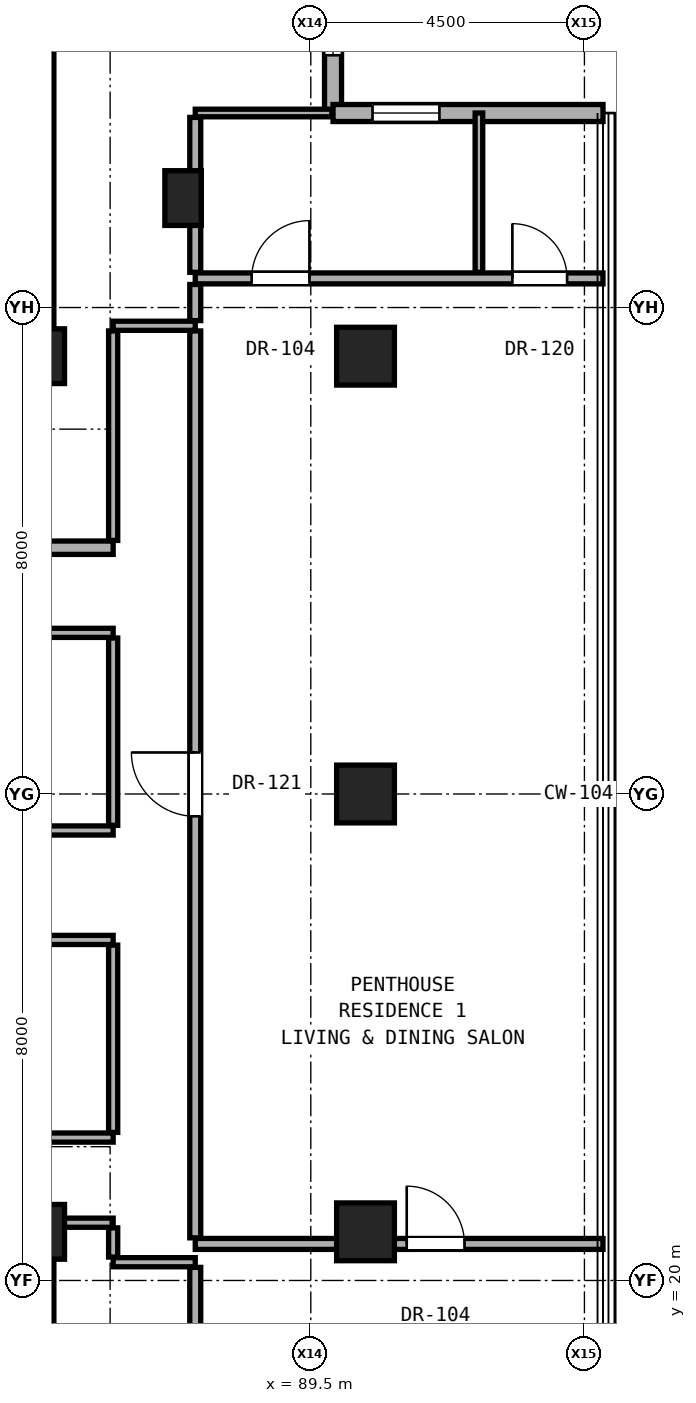
"""IFC4 building model, lengths in metres.
Left out: names, types, materials, properties, quantities, classifications, styles, units other than length and angle.
Written with IfcOpenShell. Run it as: python <this file> out.ifc"""

import sys

from ifc_helpers import new_model, si_unit, direction, frame, frame_2d, origin, origin_2d, place, context, subcontext, project, spatial, rectangle, hollow_rectangle, extrude, element, fill, save


model = new_model("IFC4")
c1 = context("Model", 3, precision=1e-05, world=origin(), true_north=direction((0.0, 1.0)))
c2 = subcontext(c1, "Body", "Model", "MODEL_VIEW")
j1 = project(units=[si_unit("LENGTHUNIT", "METRE"), si_unit("PLANEANGLEUNIT", "RADIAN")], contexts=[c1])
p1 = place(None, origin())
s1 = spatial("IfcSite", under=j1, at=p1, CompositionType="ELEMENT")
p2 = place(p1, origin())
s2 = spatial("IfcBuilding", under=s1, at=p2, CompositionType="ELEMENT")
p3 = place(p2, frame((0.0, 0.0, 203.15)))
s3 = spatial("IfcBuildingStorey", under=s2, at=p3, CompositionType="ELEMENT", Elevation=203.15)
for number, where, z_axis, x_axis in (
    (1, (85.0, 20.8, 0.0), (0.0, 0.0, 1.0), (1.0, 0.0, 0.0)),
    (2, (85.0, 35.2, 0.0), (0.0, 0.0, 1.0), (1.0, 0.0, 0.0)),
):
    element("IfcColumn", number, at=place(p3, frame(where, z_axis=z_axis, x_axis=x_axis)), inside=s3, PredefinedType="COLUMN", context=c2, shape_type="SweptSolid", body=[
        extrude(rectangle(XDim=0.9, YDim=0.9, at=origin_2d()), origin(), (0.0, 0.0, 1.0), 3.25),
    ])
for number, where, z_axis, x_axis in (
    (3, (90.4, 20.8, 0.0), (0.0, 0.0, 1.0), (1.0, 0.0, 0.0)),
    (4, (90.4, 28.0, 0.0), (0.0, 0.0, 1.0), (1.0, 0.0, 0.0)),
    (5, (90.4, 35.2, 0.0), (0.0, 0.0, 1.0), (1.0, 0.0, 0.0)),
):
    element("IfcColumn", number, at=place(p3, frame(where, z_axis=z_axis, x_axis=x_axis)), inside=s3, PredefinedType="COLUMN", context=c2, shape_type="SweptSolid", body=[
        extrude(hollow_rectangle(XDim=0.95, YDim=0.95, WallThickness=0.05, at=origin_2d()), origin(), (0.0, 0.0, 1.0), 3.25),
    ])
p4 = place(p3, frame((87.4, 37.8, 0.0), z_axis=(0.0, 0.0, 1.0), x_axis=(1.0, 0.0, 0.0)))
e6 = element("IfcColumn", 6, at=p4, inside=s3, PredefinedType="PILASTER", context=c2, shape_type="SweptSolid", body=[
    extrude(rectangle(XDim=0.6, YDim=0.9, at=origin_2d()), origin(), (0.0, 0.0, 1.0), 3.25),
])
for number, where, z_axis, x_axis in (
    (7, (85.0, 35.2, 0.0), (0.0, 0.0, 1.0), (0.0, 1.0, 0.0)),
    (8, (85.0, 15.2, 0.0), (0.0, 0.0, 1.0), (0.0, 1.0, 0.0)),
):
    element("IfcWall", number, at=place(p3, frame(where, z_axis=z_axis, x_axis=x_axis)), inside=s3, PredefinedType="SHEAR", context=c2, shape_type="SweptSolid", body=[
        extrude(rectangle(XDim=5.6, YDim=0.55, at=frame_2d((2.8, 0.0))), origin(), (0.0, 0.0, 1.0), 3.05),
    ])
p5 = place(p3, frame((89.866, 39.198, 0.0), z_axis=(0.0, 0.0, 1.0), x_axis=(0.0, 1.0, 0.0)))
e9 = element("IfcWall", 9, at=p5, inside=s3, PredefinedType="SOLIDWALL", context=c2, shape_type="SweptSolid", body=[
    extrude(rectangle(XDim=4.44, YDim=0.28, at=frame_2d((2.22, 0.0))), origin(), (0.0, 0.0, 1.0), 3.03),
])
p6 = place(p5, frame((0.95, 0.0, 0.85)))
e10 = element("IfcOpeningElement", 10, at=p6, cuts=e9, PredefinedType="OPENING", context=c2, shape_type="SweptSolid", body=[
    extrude(rectangle(XDim=1.1, YDim=2.0, at=frame_2d((0.55, 1.0))), frame((0.0, 0.15, 0.0), z_axis=(0.0, -1.0, 0.0), x_axis=(1.0, 0.0, 0.0)), (0.0, 0.0, 1.0), 0.3),
])
p7 = place(p3, frame((94.305, 39.198, 0.0), z_axis=(0.0, 0.0, 1.0), x_axis=(-1.0, 0.0, 0.0)))
e11 = element("IfcWall", 11, at=p7, inside=s3, PredefinedType="SOLIDWALL", context=c2, shape_type="SweptSolid", body=[
    extrude(rectangle(XDim=4.44, YDim=0.28, at=frame_2d((2.22, 0.0))), origin(), (0.0, 0.0, 1.0), 3.03),
])
p8 = place(p7, frame((2.69, 0.0, 0.85)))
e12 = element("IfcOpeningElement", 12, at=p8, cuts=e11, PredefinedType="OPENING", context=c2, shape_type="SweptSolid", body=[
    extrude(rectangle(XDim=1.1, YDim=2.0, at=frame_2d((0.55, 1.0))), frame((0.0, 0.15, 0.0), z_axis=(0.0, -1.0, 0.0), x_axis=(1.0, 0.0, 0.0)), (0.0, 0.0, 1.0), 0.3),
])
p9 = place(p3, frame((86.25, 20.3, 0.0), z_axis=(0.0, 0.0, 1.0), x_axis=(1.0, 0.0, 0.0)))
e13 = element("IfcWall", 13, at=p9, inside=s3, PredefinedType="PARTITIONING", context=c2, shape_type="SweptSolid", body=[
    extrude(rectangle(XDim=1.35, YDim=0.15, at=frame_2d((0.675, 0.0))), origin(), (0.0, 0.0, 1.0), 3.05),
])
p10 = place(p3, frame((87.6, 20.601, 0.0), z_axis=(0.0, 0.0, 1.0), x_axis=(1.0, 0.0, 0.0)))
e14 = element("IfcWall", 14, at=p10, inside=s3, PredefinedType="PARTITIONING", context=c2, shape_type="SweptSolid", body=[
    extrude(rectangle(XDim=6.705, YDim=0.18, at=frame_2d((3.353, 0.0))), origin(), (0.0, 0.0, 1.0), 2.442),
])
p11 = place(p10, frame((3.478, 0.0, 0.0)))
e15 = element("IfcOpeningElement", 15, at=p11, cuts=e14, PredefinedType="OPENING", context=c2, shape_type="SweptSolid", body=[
    extrude(rectangle(XDim=0.95, YDim=2.15, at=frame_2d((0.475, 1.075))), frame((0.0, 0.1, 0.0), z_axis=(0.0, -1.0, 0.0), x_axis=(1.0, 0.0, 0.0)), (0.0, 0.0, 1.0), 0.2),
])
p12 = place(p3, frame((85.27, 20.95, 0.0), z_axis=(0.0, 0.0, 1.0), x_axis=(1.0, 0.0, 0.0)))
e16 = element("IfcWall", 16, at=p12, inside=s3, PredefinedType="PARTITIONING", context=c2, shape_type="SweptSolid", body=[
    extrude(rectangle(XDim=0.98, YDim=0.15, at=frame_2d((0.49, 0.0))), origin(), (0.0, 0.0, 1.0), 2.442),
])
p13 = place(p3, frame((78.64, 22.35, 0.0), z_axis=(0.0, 0.0, 1.0), x_axis=(1.0, 0.0, 0.0)))
e17 = element("IfcWall", 17, at=p13, inside=s3, PredefinedType="PARTITIONING", context=c2, shape_type="SweptSolid", body=[
    extrude(rectangle(XDim=7.61, YDim=0.15, at=frame_2d((3.805, 0.0))), origin(), (0.0, 0.0, 1.0), 2.186),
])
p14 = place(p13, frame((3.33, 0.0, 0.0)))
e18 = element("IfcOpeningElement", 18, at=p14, cuts=e17, PredefinedType="OPENING", context=c2, shape_type="SweptSolid", body=[
    extrude(rectangle(XDim=0.95, YDim=2.15, at=frame_2d((0.475, 1.075))), frame((0.0, 0.085, 0.0), z_axis=(0.0, -1.0, 0.0), x_axis=(1.0, 0.0, 0.0)), (0.0, 0.0, 1.0), 0.17),
])
for number, where, z_axis, x_axis in (
    (19, (78.6, 25.6, 0.0), (0.0, 0.0, 1.0), (1.0, 0.0, 0.0)),
    (20, (78.6, 27.4, 0.0), (0.0, 0.0, 1.0), (1.0, 0.0, 0.0)),
):
    element("IfcWall", number, at=place(p3, frame(where, z_axis=z_axis, x_axis=x_axis)), inside=s3, PredefinedType="PARTITIONING", context=c2, shape_type="SweptSolid", body=[
        extrude(rectangle(XDim=7.65, YDim=0.15, at=frame_2d((3.825, 0.0))), origin(), (0.0, 0.0, 1.0), 2.186),
    ])
p15 = place(p3, frame((78.64, 30.65, 0.0), z_axis=(0.0, 0.0, 1.0), x_axis=(1.0, 0.0, 0.0)))
e21 = element("IfcWall", 21, at=p15, inside=s3, PredefinedType="PARTITIONING", context=c2, shape_type="SweptSolid", body=[
    extrude(rectangle(XDim=7.61, YDim=0.15, at=frame_2d((3.805, 0.0))), origin(), (0.0, 0.0, 1.0), 2.186),
])
p16 = place(p15, frame((3.33, 0.0, 0.0)))
e22 = element("IfcOpeningElement", 22, at=p16, cuts=e21, PredefinedType="OPENING", context=c2, shape_type="SweptSolid", body=[
    extrude(rectangle(XDim=0.95, YDim=2.15, at=frame_2d((0.475, 1.075))), frame((0.0, 0.085, 0.0), z_axis=(0.0, -1.0, 0.0), x_axis=(1.0, 0.0, 0.0)), (0.0, 0.0, 1.0), 0.17),
])
p17 = place(p3, frame((71.55, 32.05, 0.0), z_axis=(0.0, 0.0, 1.0), x_axis=(1.0, 0.0, 0.0)))
e23 = element("IfcWall", 23, at=p17, inside=s3, PredefinedType="SOLIDWALL", context=c2, shape_type="SweptSolid", body=[
    extrude(rectangle(XDim=14.7, YDim=0.22, at=frame_2d((7.35, 0.0))), origin(), (0.0, 0.0, 1.0), 2.186),
])
p18 = place(p17, frame((6.065, 0.0, 0.0)))
e24 = element("IfcOpeningElement", 24, at=p18, cuts=e23, PredefinedType="OPENING", context=c2, shape_type="SweptSolid", body=[
    extrude(rectangle(XDim=0.85, YDim=2.01, at=frame_2d((0.425, 1.005))), frame((0.0, 0.12, 0.0), z_axis=(0.0, -1.0, 0.0), x_axis=(1.0, 0.0, 0.0)), (0.0, 0.0, 1.0), 0.24),
])
p19 = place(p17, frame((10.535, 0.0, 0.0)))
e25 = element("IfcOpeningElement", 25, at=p19, cuts=e23, PredefinedType="OPENING", context=c2, shape_type="SweptSolid", body=[
    extrude(rectangle(XDim=0.95, YDim=2.15, at=frame_2d((0.475, 1.075))), frame((0.0, 0.12, 0.0), z_axis=(0.0, -1.0, 0.0), x_axis=(1.0, 0.0, 0.0)), (0.0, 0.0, 1.0), 0.24),
])
p20 = place(p17, frame((0.7, 0.0, 0.0)))
e26 = element("IfcOpeningElement", 26, at=p20, cuts=e23, PredefinedType="OPENING", context=c2, shape_type="SweptSolid", body=[
    extrude(rectangle(XDim=0.85, YDim=2.01, at=frame_2d((0.425, 1.005))), frame((0.0, 0.12, 0.0), z_axis=(0.0, -1.0, 0.0), x_axis=(1.0, 0.0, 0.0)), (0.0, 0.0, 1.0), 0.24),
])
p21 = place(p17, frame((2.55, 0.0, 0.0)))
e27 = element("IfcOpeningElement", 27, at=p21, cuts=e23, PredefinedType="OPENING", context=c2, shape_type="SweptSolid", body=[
    extrude(rectangle(XDim=0.85, YDim=2.01, at=frame_2d((0.425, 1.005))), frame((0.0, 0.12, 0.0), z_axis=(0.0, -1.0, 0.0), x_axis=(1.0, 0.0, 0.0)), (0.0, 0.0, 1.0), 0.24),
])
p22 = place(p3, frame((86.25, 35.7, 0.0), z_axis=(0.0, 0.0, 1.0), x_axis=(1.0, 0.0, 0.0)))
e28 = element("IfcWall", 28, at=p22, inside=s3, PredefinedType="PARTITIONING", context=c2, shape_type="SweptSolid", body=[
    extrude(rectangle(XDim=1.35, YDim=0.15, at=frame_2d((0.675, 0.0))), origin(), (0.0, 0.0, 1.0), 3.05),
])
p23 = place(p3, frame((87.6, 36.479, 0.0), z_axis=(0.0, 0.0, 1.0), x_axis=(1.0, 0.0, 0.0)))
e29 = element("IfcWall", 29, at=p23, inside=s3, PredefinedType="PARTITIONING", context=c2, shape_type="SweptSolid", body=[
    extrude(rectangle(XDim=6.705, YDim=0.18, at=frame_2d((3.353, 0.0))), origin(), (0.0, 0.0, 1.0), 2.493),
])
p24 = place(p23, frame((0.927, 0.0, 0.0)))
e30 = element("IfcOpeningElement", 30, at=p24, cuts=e29, PredefinedType="OPENING", context=c2, shape_type="SweptSolid", body=[
    extrude(rectangle(XDim=0.95, YDim=2.15, at=frame_2d((0.475, 1.075))), frame((0.0, 0.1, 0.0), z_axis=(0.0, -1.0, 0.0), x_axis=(1.0, 0.0, 0.0)), (0.0, 0.0, 1.0), 0.2),
])
p25 = place(p23, frame((5.215, 0.0, 0.0)))
e31 = element("IfcOpeningElement", 31, at=p25, cuts=e29, PredefinedType="OPENING", context=c2, shape_type="SweptSolid", body=[
    extrude(rectangle(XDim=0.9, YDim=2.1, at=frame_2d((0.45, 1.05))), frame((0.0, 0.1, 0.0), z_axis=(0.0, -1.0, 0.0), x_axis=(1.0, 0.0, 0.0)), (0.0, 0.0, 1.0), 0.2),
])
p26 = place(p3, frame((87.6, 39.199, 0.0), z_axis=(0.0, 0.0, 1.0), x_axis=(1.0, 0.0, 0.0)))
e32 = element("IfcWall", 32, at=p26, inside=s3, PredefinedType="PARTITIONING", context=c2, shape_type="SweptSolid", body=[
    extrude(rectangle(XDim=2.246, YDim=0.125, at=frame_2d((1.123, 0.0))), origin(), (0.0, 0.0, 1.0), 3.05),
])
p27 = place(p3, frame((86.25, 20.385, 0.0), z_axis=(0.0, 0.0, 1.0), x_axis=(0.0, 1.0, 0.0)))
e33 = element("IfcWall", 33, at=p27, inside=s3, PredefinedType="PARTITIONING", context=c2, shape_type="SweptSolid", body=[
    extrude(rectangle(XDim=0.48, YDim=0.15, at=frame_2d((0.24, 0.0))), origin(), (0.0, 0.0, 1.0), 2.442),
])
p28 = place(p3, frame((86.25, 22.435, 0.0), z_axis=(0.0, 0.0, 1.0), x_axis=(0.0, 1.0, 0.0)))
e34 = element("IfcWall", 34, at=p28, inside=s3, PredefinedType="PARTITIONING", context=c2, shape_type="SweptSolid", body=[
    extrude(rectangle(XDim=3.08, YDim=0.15, at=frame_2d((1.54, 0.0))), origin(), (0.0, 0.0, 1.0), 3.05),
])
p29 = place(p3, frame((86.25, 27.485, 0.0), z_axis=(0.0, 0.0, 1.0), x_axis=(0.0, 1.0, 0.0)))
e35 = element("IfcWall", 35, at=p29, inside=s3, PredefinedType="PARTITIONING", context=c2, shape_type="SweptSolid", body=[
    extrude(rectangle(XDim=3.08, YDim=0.15, at=frame_2d((1.54, 0.0))), origin(), (0.0, 0.0, 1.0), 2.346),
])
p30 = place(p3, frame((86.25, 32.17, 0.0), z_axis=(0.0, 0.0, 1.0), x_axis=(0.0, 1.0, 0.0)))
e36 = element("IfcWall", 36, at=p30, inside=s3, PredefinedType="PARTITIONING", context=c2, shape_type="SweptSolid", body=[
    extrude(rectangle(XDim=3.445, YDim=0.15, at=frame_2d((1.723, 0.0))), origin(), (0.0, 0.0, 1.0), 2.442),
])
p31 = place(p3, frame((87.6, 16.874, 0.0), z_axis=(0.0, 0.0, 1.0), x_axis=(0.0, 1.0, 0.0)))
e37 = element("IfcWall", 37, at=p31, inside=s3, PredefinedType="PARTITIONING", context=c2, shape_type="SweptSolid", body=[
    extrude(rectangle(XDim=3.342, YDim=0.18, at=frame_2d((1.671, 0.0))), origin(), (0.0, 0.0, 1.0), 2.493),
])
p32 = place(p3, frame((87.6, 20.701, 0.0), z_axis=(0.0, 0.0, 1.0), x_axis=(0.0, 1.0, 0.0)))
e38 = element("IfcWall", 38, at=p32, inside=s3, PredefinedType="PARTITIONING", context=c2, shape_type="SweptSolid", body=[
    extrude(rectangle(XDim=14.914, YDim=0.18, at=frame_2d((7.457, 0.0))), origin(), (0.0, 0.0, 1.0), 2.346),
])
p33 = place(p32, frame((6.932, 0.0, 0.0)))
e39 = element("IfcOpeningElement", 39, at=p33, cuts=e38, PredefinedType="OPENING", context=c2, shape_type="SweptSolid", body=[
    extrude(rectangle(XDim=1.05, YDim=2.2, at=frame_2d((0.525, 1.1))), frame((0.0, 0.1, 0.0), z_axis=(0.0, -1.0, 0.0), x_axis=(1.0, 0.0, 0.0)), (0.0, 0.0, 1.0), 0.2),
])
p34 = place(p3, frame((87.6, 35.785, 0.0), z_axis=(0.0, 0.0, 1.0), x_axis=(0.0, 1.0, 0.0)))
e40 = element("IfcWall", 40, at=p34, inside=s3, PredefinedType="PARTITIONING", context=c2, shape_type="SweptSolid", body=[
    extrude(rectangle(XDim=0.594, YDim=0.18, at=frame_2d((0.297, 0.0))), origin(), (0.0, 0.0, 1.0), 3.05),
])
p35 = place(p3, frame((87.6, 36.579, 0.0), z_axis=(0.0, 0.0, 1.0), x_axis=(0.0, 1.0, 0.0)))
e41 = element("IfcWall", 41, at=p35, inside=s3, PredefinedType="PARTITIONING", context=c2, shape_type="SweptSolid", body=[
    extrude(rectangle(XDim=2.547, YDim=0.18, at=frame_2d((1.274, 0.0))), origin(), (0.0, 0.0, 1.0), 2.493),
])
p36 = place(p3, frame((92.265, 36.579, 0.0), z_axis=(0.0, 0.0, 1.0), x_axis=(0.0, 1.0, 0.0)))
e42 = element("IfcWall", 42, at=p36, inside=s3, PredefinedType="PARTITIONING", context=c2, shape_type="SweptSolid", body=[
    extrude(rectangle(XDim=2.62, YDim=0.125, at=frame_2d((1.31, 0.0))), origin(), (0.0, 0.0, 1.0), 3.05),
])
p37 = place(p6, origin())
e43 = element("IfcWindow", 43, at=p37, inside=s3, PartitioningType="SINGLE_PANEL", PredefinedType="WINDOW", context=c2, shape_type="SweptSolid", body=[
    extrude(rectangle(XDim=1.1, YDim=2.0, at=frame_2d((0.55, 1.0))), frame((0.0, 0.03, 0.0), z_axis=(0.0, -1.0, 0.0), x_axis=(1.0, 0.0, 0.0)), (0.0, 0.0, 1.0), 0.06),
])
fill(e10, e43)
p38 = place(p8, origin())
e44 = element("IfcWindow", 44, at=p38, inside=s3, PartitioningType="SINGLE_PANEL", PredefinedType="WINDOW", context=c2, shape_type="SweptSolid", body=[
    extrude(rectangle(XDim=1.1, YDim=2.0, at=frame_2d((0.55, 1.0))), frame((0.0, 0.03, 0.0), z_axis=(0.0, -1.0, 0.0), x_axis=(1.0, 0.0, 0.0)), (0.0, 0.0, 1.0), 0.06),
])
fill(e12, e44)
p39 = place(p33, origin())
e45 = element("IfcDoor", 45, at=p39, inside=s3, OperationType="SINGLE_SWING_RIGHT", PredefinedType="DOOR", context=c2, shape_type="SweptSolid", body=[
    extrude(rectangle(XDim=1.05, YDim=2.2, at=frame_2d((0.525, 1.1))), frame((0.0, 0.025, 0.0), z_axis=(0.0, -1.0, 0.0), x_axis=(1.0, 0.0, 0.0)), (0.0, 0.0, 1.0), 0.05),
])
fill(e39, e45)
p40 = place(p11, origin())
e46 = element("IfcDoor", 46, at=p40, inside=s3, OperationType="SINGLE_SWING_LEFT", PredefinedType="DOOR", context=c2, shape_type="SweptSolid", body=[
    extrude(rectangle(XDim=0.95, YDim=2.15, at=frame_2d((0.475, 1.075))), frame((0.0, 0.025, 0.0), z_axis=(0.0, -1.0, 0.0), x_axis=(1.0, 0.0, 0.0)), (0.0, 0.0, 1.0), 0.05),
])
fill(e15, e46)
p41 = place(p24, origin())
e47 = element("IfcDoor", 47, at=p41, inside=s3, OperationType="SINGLE_SWING_RIGHT", PredefinedType="DOOR", context=c2, shape_type="SweptSolid", body=[
    extrude(rectangle(XDim=0.95, YDim=2.15, at=frame_2d((0.475, 1.075))), frame((0.0, 0.025, 0.0), z_axis=(0.0, -1.0, 0.0), x_axis=(1.0, 0.0, 0.0)), (0.0, 0.0, 1.0), 0.05),
])
fill(e30, e47)
p42 = place(p25, origin())
e48 = element("IfcDoor", 48, at=p42, inside=s3, OperationType="SINGLE_SWING_LEFT", PredefinedType="DOOR", context=c2, shape_type="SweptSolid", body=[
    extrude(rectangle(XDim=0.9, YDim=2.1, at=frame_2d((0.45, 1.05))), frame((0.0, 0.025, 0.0), z_axis=(0.0, -1.0, 0.0), x_axis=(1.0, 0.0, 0.0)), (0.0, 0.0, 1.0), 0.05),
])
fill(e31, e48)
save(model, sys.argv[1])
